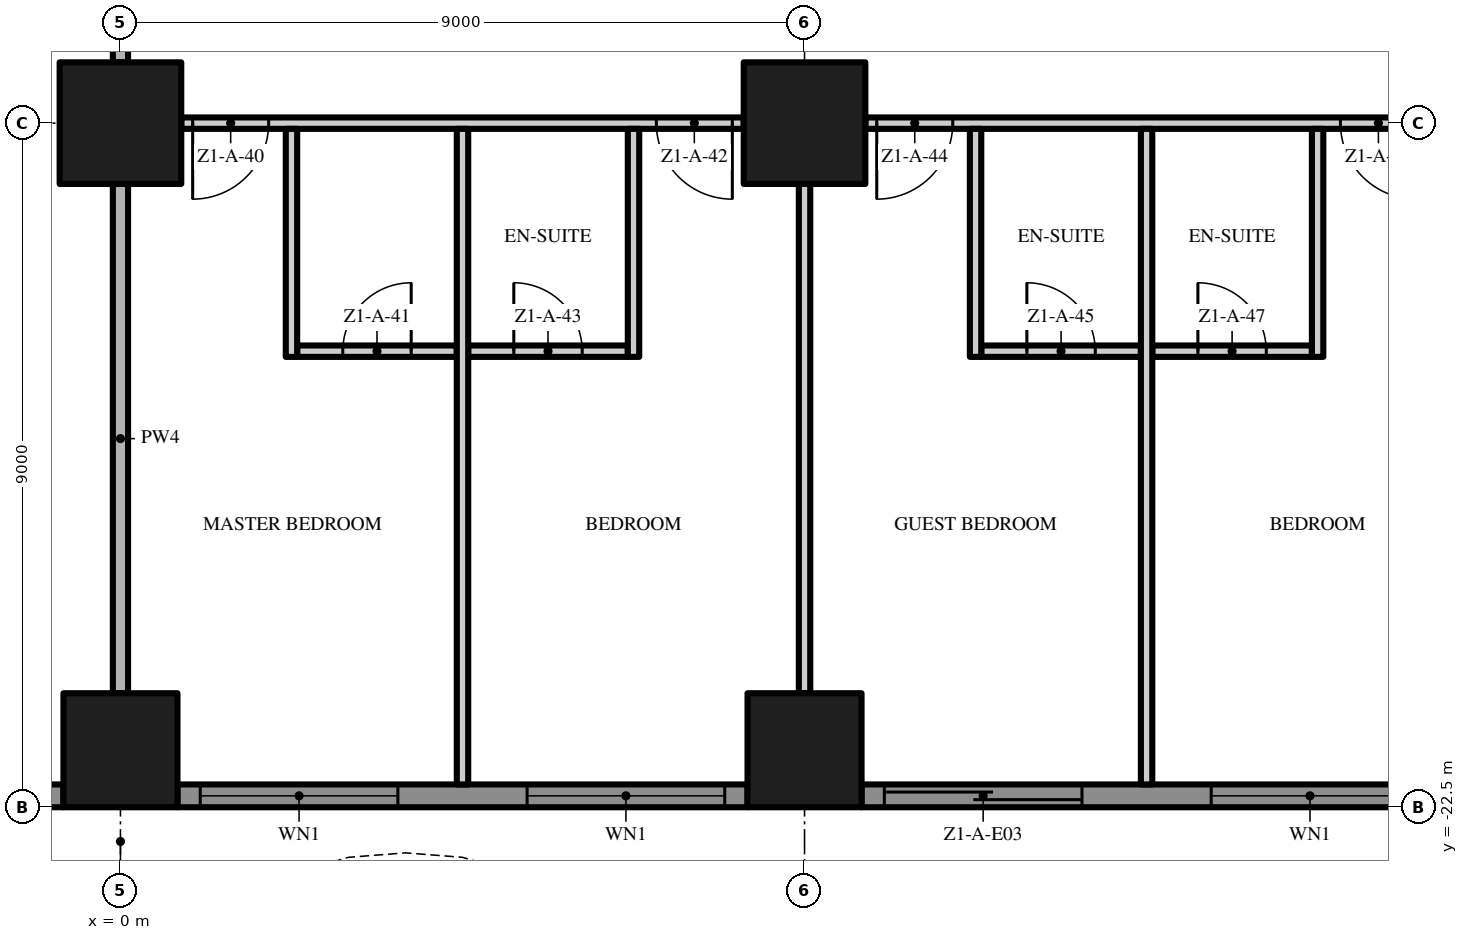
"""IFC4 building model, lengths in metres.
Left out: names, types, materials, properties, quantities, classifications, styles, units other than length and angle.
Written with IfcOpenShell. Run it as: python <this file> out.ifc"""

import sys

from ifc_helpers import new_model, si_unit, direction, frame, frame_2d, origin, origin_2d, place, context, subcontext, project, spatial, polyline, rectangle, outline, extrude, element, fill, save


model = new_model("IFC4")
c1 = context("Model", 3, precision=1e-05, world=origin(), true_north=direction((0.0, 1.0)))
c2 = subcontext(c1, "Body", "Model", "MODEL_VIEW")
j1 = project(units=[si_unit("LENGTHUNIT", "METRE"), si_unit("PLANEANGLEUNIT", "RADIAN")], contexts=[c1])
p1 = place(None, origin())
s1 = spatial("IfcSite", under=j1, at=p1, CompositionType="ELEMENT")
p2 = place(p1, origin())
s2 = spatial("IfcBuilding", under=s1, at=p2, CompositionType="ELEMENT")
p3 = place(p2, frame((0.0, 0.0, 15.0)))
s3 = spatial("IfcBuildingStorey", under=s2, at=p3, CompositionType="ELEMENT", Elevation=15.0)
p4 = place(p3, frame((0.0, -13.5, 0.0), z_axis=(0.0, 0.0, 1.0), x_axis=(1.0, 0.0, 0.0)))
e1 = element("IfcColumn", 1, at=p4, inside=s3, PredefinedType="COLUMN", context=c2, shape_type="SweptSolid", body=[
    extrude(rectangle(XDim=1.6, YDim=1.6, at=origin_2d()), origin(), (0.0, 0.0, 1.0), 3.5),
])
p5 = place(p3, frame((0.0, -21.75, 0.0), z_axis=(0.0, 0.0, 1.0), x_axis=(1.0, 0.0, 0.0)))
e2 = element("IfcColumn", 2, at=p5, inside=s3, PredefinedType="COLUMN", context=c2, shape_type="SweptSolid", body=[
    extrude(rectangle(XDim=1.5, YDim=1.5, at=origin_2d()), origin(), (0.0, 0.0, 1.0), 3.5),
])
p6 = place(p3, frame((9.0, -13.5, 0.0), z_axis=(0.0, 0.0, 1.0), x_axis=(1.0, 0.0, 0.0)))
e3 = element("IfcColumn", 3, at=p6, inside=s3, PredefinedType="COLUMN", context=c2, shape_type="SweptSolid", body=[
    extrude(rectangle(XDim=1.6, YDim=1.6, at=origin_2d()), origin(), (0.0, 0.0, 1.0), 3.5),
])
p7 = place(p3, frame((9.0, -21.75, 0.0), z_axis=(0.0, 0.0, 1.0), x_axis=(1.0, 0.0, 0.0)))
e4 = element("IfcColumn", 4, at=p7, inside=s3, PredefinedType="COLUMN", context=c2, shape_type="SweptSolid", body=[
    extrude(rectangle(XDim=1.5, YDim=1.5, at=origin_2d()), origin(), (0.0, 0.0, 1.0), 3.5),
])
p8 = place(p3, frame((-0.75, -22.35, 0.0), z_axis=(0.0, 0.0, 1.0), x_axis=(-1.0, 0.0, 0.0)))
e5 = element("IfcWall", 5, at=p8, inside=s3, PredefinedType="SOLIDWALL", context=c2, shape_type="SweptSolid", body=[
    extrude(rectangle(XDim=7.5, YDim=0.3, at=frame_2d((3.75, 0.0))), origin(), (0.0, 0.0, 1.0), 3.5),
])
p9 = place(p8, frame((4.6, 0.0, 0.45)))
e6 = element("IfcOpeningElement", 6, at=p9, cuts=e5, PredefinedType="OPENING", context=c2, shape_type="SweptSolid", body=[
    extrude(rectangle(XDim=2.6, YDim=2.65, at=frame_2d((1.3, 1.325))), frame((0.0, 0.16, 0.0), z_axis=(0.0, -1.0, 0.0), x_axis=(1.0, 0.0, 0.0)), (0.0, 0.0, 1.0), 0.32),
])
p10 = place(p8, frame((0.3, 0.0, 0.0)))
e7 = element("IfcOpeningElement", 7, at=p10, cuts=e5, PredefinedType="OPENING", context=c2, shape_type="SweptSolid", body=[
    extrude(rectangle(XDim=2.6, YDim=2.4, at=frame_2d((1.3, 1.2))), frame((0.0, 0.16, 0.0), z_axis=(0.0, -1.0, 0.0), x_axis=(1.0, 0.0, 0.0)), (0.0, 0.0, 1.0), 0.32),
])
p11 = place(p3, frame((8.25, -22.35, 0.0), z_axis=(0.0, 0.0, 1.0), x_axis=(-1.0, 0.0, 0.0)))
e8 = element("IfcWall", 8, at=p11, inside=s3, PredefinedType="SOLIDWALL", context=c2, shape_type="SweptSolid", body=[
    extrude(rectangle(XDim=7.5, YDim=0.3, at=frame_2d((3.75, 0.0))), origin(), (0.0, 0.0, 1.0), 3.5),
])
p12 = place(p11, frame((4.6, 0.0, 0.45)))
e9 = element("IfcOpeningElement", 9, at=p12, cuts=e8, PredefinedType="OPENING", context=c2, shape_type="SweptSolid", body=[
    extrude(rectangle(XDim=2.6, YDim=2.65, at=frame_2d((1.3, 1.325))), frame((0.0, 0.16, 0.0), z_axis=(0.0, -1.0, 0.0), x_axis=(1.0, 0.0, 0.0)), (0.0, 0.0, 1.0), 0.32),
])
p13 = place(p11, frame((0.3, 0.0, 0.45)))
e10 = element("IfcOpeningElement", 10, at=p13, cuts=e8, PredefinedType="OPENING", context=c2, shape_type="SweptSolid", body=[
    extrude(rectangle(XDim=2.6, YDim=2.65, at=frame_2d((1.3, 1.325))), frame((0.0, 0.16, 0.0), z_axis=(0.0, -1.0, 0.0), x_axis=(1.0, 0.0, 0.0)), (0.0, 0.0, 1.0), 0.32),
])
p14 = place(p3, frame((17.25, -22.35, 0.0), z_axis=(0.0, 0.0, 1.0), x_axis=(-1.0, 0.0, 0.0)))
e11 = element("IfcWall", 11, at=p14, inside=s3, PredefinedType="SOLIDWALL", context=c2, shape_type="SweptSolid", body=[
    extrude(rectangle(XDim=7.5, YDim=0.3, at=frame_2d((3.75, 0.0))), origin(), (0.0, 0.0, 1.0), 3.5),
])
p15 = place(p14, frame((4.6, 0.0, 0.0)))
e12 = element("IfcOpeningElement", 12, at=p15, cuts=e11, PredefinedType="OPENING", context=c2, shape_type="SweptSolid", body=[
    extrude(rectangle(XDim=2.6, YDim=2.4, at=frame_2d((1.3, 1.2))), frame((0.0, 0.16, 0.0), z_axis=(0.0, -1.0, 0.0), x_axis=(1.0, 0.0, 0.0)), (0.0, 0.0, 1.0), 0.32),
])
p16 = place(p14, frame((0.3, 0.0, 0.45)))
e13 = element("IfcOpeningElement", 13, at=p16, cuts=e11, PredefinedType="OPENING", context=c2, shape_type="SweptSolid", body=[
    extrude(rectangle(XDim=2.6, YDim=2.65, at=frame_2d((1.3, 1.325))), frame((0.0, 0.16, 0.0), z_axis=(0.0, -1.0, 0.0), x_axis=(1.0, 0.0, 0.0)), (0.0, 0.0, 1.0), 0.32),
])
p17 = place(p3, origin())
e14 = element("IfcWall", 14, at=p17, inside=s3, PredefinedType="USERDEFINED", context=c2, shape_type="SweptSolid", body=[
    extrude(outline(polyline([(-22.5, -24.3), (-21.0, -25.005), (-19.5, -25.441), (-18.75, -25.5), (-18.0, -25.441), (-16.5, -25.005), (-15.0, -24.3), (-13.5, -23.595), (-12.0, -23.159), (-11.25, -23.1), (-10.5, -23.159), (-9.0, -23.595), (-7.5, -24.3), (-6.0, -25.005), (-4.5, -25.441), (-3.75, -25.5), (-3.0, -25.441), (-1.5, -25.005), (0.0, -24.3), (1.5, -23.595), (3.0, -23.159), (3.75, -23.1), (4.5, -23.159), (6.0, -23.595), (7.5, -24.3), (9.0, -25.005), (10.5, -25.441), (11.25, -25.5), (12.0, -25.441), (13.5, -25.005), (15.0, -24.3), (16.5, -23.595), (18.0, -23.159), (18.75, -23.1), (19.5, -23.159), (21.0, -23.595), (22.5, -24.3), (22.606, -24.074), (21.089, -23.36), (19.545, -22.911), (18.75, -22.849), (17.955, -22.911), (16.411, -23.36), (14.894, -24.074), (13.411, -24.771), (11.955, -25.194), (11.25, -25.249), (10.545, -25.194), (9.089, -24.771), (7.606, -24.074), (6.089, -23.36), (4.545, -22.911), (3.75, -22.849), (2.955, -22.911), (1.411, -23.36), (-0.106, -24.074), (-1.589, -24.771), (-3.045, -25.194), (-3.75, -25.249), (-4.455, -25.194), (-5.911, -24.771), (-7.394, -24.074), (-8.911, -23.36), (-10.455, -22.911), (-11.25, -22.849), (-12.045, -22.911), (-13.589, -23.36), (-15.106, -24.074), (-16.589, -24.771), (-18.045, -25.194), (-18.75, -25.249), (-19.455, -25.194), (-20.911, -24.771), (-22.394, -24.074), (-22.5, -24.3)])), origin(), (0.0, 0.0, 1.0), 0.9),
])
p18 = place(p3, frame((2.325, -16.5, 0.0), z_axis=(0.0, 0.0, 1.0), x_axis=(1.0, 0.0, 0.0)))
e15 = element("IfcWall", 15, at=p18, inside=s3, PredefinedType="PARTITIONING", context=c2, shape_type="SweptSolid", body=[
    extrude(rectangle(XDim=2.1, YDim=0.15, at=frame_2d((1.05, 0.0))), origin(), (0.0, 0.0, 1.0), 3.5),
])
p19 = place(p18, frame((0.6, 0.0, 0.0)))
e16 = element("IfcOpeningElement", 16, at=p19, cuts=e15, PredefinedType="OPENING", context=c2, shape_type="SweptSolid", body=[
    extrude(rectangle(XDim=0.9, YDim=2.1, at=frame_2d((0.45, 1.05))), frame((0.0, 0.085, 0.0), z_axis=(0.0, -1.0, 0.0), x_axis=(1.0, 0.0, 0.0)), (0.0, 0.0, 1.0), 0.17),
])
p20 = place(p3, frame((4.575, -16.5, 0.0), z_axis=(0.0, 0.0, 1.0), x_axis=(1.0, 0.0, 0.0)))
e17 = element("IfcWall", 17, at=p20, inside=s3, PredefinedType="PARTITIONING", context=c2, shape_type="SweptSolid", body=[
    extrude(rectangle(XDim=2.1, YDim=0.15, at=frame_2d((1.05, 0.0))), origin(), (0.0, 0.0, 1.0), 3.5),
])
p21 = place(p20, frame((0.6, 0.0, 0.0)))
e18 = element("IfcOpeningElement", 18, at=p21, cuts=e17, PredefinedType="OPENING", context=c2, shape_type="SweptSolid", body=[
    extrude(rectangle(XDim=0.9, YDim=2.1, at=frame_2d((0.45, 1.05))), frame((0.0, 0.085, 0.0), z_axis=(0.0, -1.0, 0.0), x_axis=(1.0, 0.0, 0.0)), (0.0, 0.0, 1.0), 0.17),
])
p22 = place(p3, frame((11.325, -16.5, 0.0), z_axis=(0.0, 0.0, 1.0), x_axis=(1.0, 0.0, 0.0)))
e19 = element("IfcWall", 19, at=p22, inside=s3, PredefinedType="PARTITIONING", context=c2, shape_type="SweptSolid", body=[
    extrude(rectangle(XDim=2.1, YDim=0.15, at=frame_2d((1.05, 0.0))), origin(), (0.0, 0.0, 1.0), 3.5),
])
p23 = place(p22, frame((0.6, 0.0, 0.0)))
e20 = element("IfcOpeningElement", 20, at=p23, cuts=e19, PredefinedType="OPENING", context=c2, shape_type="SweptSolid", body=[
    extrude(rectangle(XDim=0.9, YDim=2.1, at=frame_2d((0.45, 1.05))), frame((0.0, 0.085, 0.0), z_axis=(0.0, -1.0, 0.0), x_axis=(1.0, 0.0, 0.0)), (0.0, 0.0, 1.0), 0.17),
])
p24 = place(p3, frame((13.575, -16.5, 0.0), z_axis=(0.0, 0.0, 1.0), x_axis=(1.0, 0.0, 0.0)))
e21 = element("IfcWall", 21, at=p24, inside=s3, PredefinedType="PARTITIONING", context=c2, shape_type="SweptSolid", body=[
    extrude(rectangle(XDim=2.1, YDim=0.15, at=frame_2d((1.05, 0.0))), origin(), (0.0, 0.0, 1.0), 3.5),
])
p25 = place(p24, frame((0.6, 0.0, 0.0)))
e22 = element("IfcOpeningElement", 22, at=p25, cuts=e21, PredefinedType="OPENING", context=c2, shape_type="SweptSolid", body=[
    extrude(rectangle(XDim=0.9, YDim=2.1, at=frame_2d((0.45, 1.05))), frame((0.0, 0.085, 0.0), z_axis=(0.0, -1.0, 0.0), x_axis=(1.0, 0.0, 0.0)), (0.0, 0.0, 1.0), 0.17),
])
p26 = place(p3, frame((8.2, -13.5, 0.0), z_axis=(0.0, 0.0, 1.0), x_axis=(-1.0, 0.0, 0.0)))
e23 = element("IfcWall", 23, at=p26, inside=s3, PredefinedType="PARTITIONING", context=c2, shape_type="SweptSolid", body=[
    extrude(rectangle(XDim=7.4, YDim=0.15, at=frame_2d((3.7, 0.0))), origin(), (0.0, 0.0, 1.0), 3.5),
])
p27 = place(p26, frame((6.25, 0.0, 0.0)))
e24 = element("IfcOpeningElement", 24, at=p27, cuts=e23, PredefinedType="OPENING", context=c2, shape_type="SweptSolid", body=[
    extrude(rectangle(XDim=1.0, YDim=2.4, at=frame_2d((0.5, 1.2))), frame((0.0, 0.085, 0.0), z_axis=(0.0, -1.0, 0.0), x_axis=(1.0, 0.0, 0.0)), (0.0, 0.0, 1.0), 0.17),
])
p28 = place(p26, frame((0.15, 0.0, 0.0)))
e25 = element("IfcOpeningElement", 25, at=p28, cuts=e23, PredefinedType="OPENING", context=c2, shape_type="SweptSolid", body=[
    extrude(rectangle(XDim=1.0, YDim=2.4, at=frame_2d((0.5, 1.2))), frame((0.0, 0.085, 0.0), z_axis=(0.0, -1.0, 0.0), x_axis=(1.0, 0.0, 0.0)), (0.0, 0.0, 1.0), 0.17),
])
p29 = place(p3, frame((17.2, -13.5, 0.0), z_axis=(0.0, 0.0, 1.0), x_axis=(-1.0, 0.0, 0.0)))
e26 = element("IfcWall", 26, at=p29, inside=s3, PredefinedType="PARTITIONING", context=c2, shape_type="SweptSolid", body=[
    extrude(rectangle(XDim=7.4, YDim=0.15, at=frame_2d((3.7, 0.0))), origin(), (0.0, 0.0, 1.0), 3.5),
])
p30 = place(p29, frame((6.25, 0.0, 0.0)))
e27 = element("IfcOpeningElement", 27, at=p30, cuts=e26, PredefinedType="OPENING", context=c2, shape_type="SweptSolid", body=[
    extrude(rectangle(XDim=1.0, YDim=2.4, at=frame_2d((0.5, 1.2))), frame((0.0, 0.085, 0.0), z_axis=(0.0, -1.0, 0.0), x_axis=(1.0, 0.0, 0.0)), (0.0, 0.0, 1.0), 0.17),
])
p31 = place(p29, frame((0.15, 0.0, 0.0)))
e28 = element("IfcOpeningElement", 28, at=p31, cuts=e26, PredefinedType="OPENING", context=c2, shape_type="SweptSolid", body=[
    extrude(rectangle(XDim=1.0, YDim=2.4, at=frame_2d((0.5, 1.2))), frame((0.0, 0.085, 0.0), z_axis=(0.0, -1.0, 0.0), x_axis=(1.0, 0.0, 0.0)), (0.0, 0.0, 1.0), 0.17),
])
p32 = place(p3, frame((0.0, -21.0, 0.0), z_axis=(0.0, 0.0, 1.0), x_axis=(0.0, 1.0, 0.0)))
e29 = element("IfcWall", 29, at=p32, inside=s3, PredefinedType="PARTITIONING", context=c2, shape_type="SweptSolid", body=[
    extrude(rectangle(XDim=6.7, YDim=0.2, at=frame_2d((3.35, 0.0))), origin(), (0.0, 0.0, 1.0), 3.5),
])
p33 = place(p3, frame((0.0, -12.7, 0.0), z_axis=(0.0, 0.0, 1.0), x_axis=(0.0, 1.0, 0.0)))
e30 = element("IfcWall", 30, at=p33, inside=s3, PredefinedType="PARTITIONING", context=c2, shape_type="SweptSolid", body=[
    extrude(rectangle(XDim=7.4, YDim=0.2, at=frame_2d((3.7, 0.0))), origin(), (0.0, 0.0, 1.0), 3.5),
])
p34 = place(p3, frame((2.25, -16.575, 0.0), z_axis=(0.0, 0.0, 1.0), x_axis=(0.0, 1.0, 0.0)))
e31 = element("IfcWall", 31, at=p34, inside=s3, PredefinedType="PARTITIONING", context=c2, shape_type="SweptSolid", body=[
    extrude(rectangle(XDim=3.0, YDim=0.15, at=frame_2d((1.5, 0.0))), origin(), (0.0, 0.0, 1.0), 3.5),
])
p35 = place(p3, frame((4.5, -22.2, 0.0), z_axis=(0.0, 0.0, 1.0), x_axis=(0.0, 1.0, 0.0)))
e32 = element("IfcWall", 32, at=p35, inside=s3, PredefinedType="PARTITIONING", context=c2, shape_type="SweptSolid", body=[
    extrude(rectangle(XDim=8.625, YDim=0.15, at=frame_2d((4.312, 0.0))), origin(), (0.0, 0.0, 1.0), 3.5),
])
p36 = place(p3, frame((6.75, -16.575, 0.0), z_axis=(0.0, 0.0, 1.0), x_axis=(0.0, 1.0, 0.0)))
e33 = element("IfcWall", 33, at=p36, inside=s3, PredefinedType="PARTITIONING", context=c2, shape_type="SweptSolid", body=[
    extrude(rectangle(XDim=3.0, YDim=0.15, at=frame_2d((1.5, 0.0))), origin(), (0.0, 0.0, 1.0), 3.5),
])
p37 = place(p3, frame((9.0, -21.0, 0.0), z_axis=(0.0, 0.0, 1.0), x_axis=(0.0, 1.0, 0.0)))
e34 = element("IfcWall", 34, at=p37, inside=s3, PredefinedType="PARTITIONING", context=c2, shape_type="SweptSolid", body=[
    extrude(rectangle(XDim=6.7, YDim=0.15, at=frame_2d((3.35, 0.0))), origin(), (0.0, 0.0, 1.0), 3.5),
])
p38 = place(p3, frame((11.25, -16.575, 0.0), z_axis=(0.0, 0.0, 1.0), x_axis=(0.0, 1.0, 0.0)))
e35 = element("IfcWall", 35, at=p38, inside=s3, PredefinedType="PARTITIONING", context=c2, shape_type="SweptSolid", body=[
    extrude(rectangle(XDim=3.0, YDim=0.15, at=frame_2d((1.5, 0.0))), origin(), (0.0, 0.0, 1.0), 3.5),
])
p39 = place(p3, frame((13.5, -22.2, 0.0), z_axis=(0.0, 0.0, 1.0), x_axis=(0.0, 1.0, 0.0)))
e36 = element("IfcWall", 36, at=p39, inside=s3, PredefinedType="PARTITIONING", context=c2, shape_type="SweptSolid", body=[
    extrude(rectangle(XDim=8.625, YDim=0.15, at=frame_2d((4.312, 0.0))), origin(), (0.0, 0.0, 1.0), 3.5),
])
p40 = place(p3, frame((15.75, -16.575, 0.0), z_axis=(0.0, 0.0, 1.0), x_axis=(0.0, 1.0, 0.0)))
e37 = element("IfcWall", 37, at=p40, inside=s3, PredefinedType="PARTITIONING", context=c2, shape_type="SweptSolid", body=[
    extrude(rectangle(XDim=3.0, YDim=0.15, at=frame_2d((1.5, 0.0))), origin(), (0.0, 0.0, 1.0), 3.5),
])
p41 = place(p12, origin())
e38 = element("IfcWindow", 38, at=p41, inside=s3, PartitioningType="SINGLE_PANEL", PredefinedType="WINDOW", context=c2, shape_type="SweptSolid", body=[
    extrude(rectangle(XDim=2.6, YDim=2.65, at=frame_2d((1.3, 1.325))), frame((0.0, 0.03, 0.0), z_axis=(0.0, -1.0, 0.0), x_axis=(1.0, 0.0, 0.0)), (0.0, 0.0, 1.0), 0.06),
])
fill(e9, e38)
p42 = place(p13, origin())
e39 = element("IfcWindow", 39, at=p42, inside=s3, PartitioningType="SINGLE_PANEL", PredefinedType="WINDOW", context=c2, shape_type="SweptSolid", body=[
    extrude(rectangle(XDim=2.6, YDim=2.65, at=frame_2d((1.3, 1.325))), frame((0.0, 0.03, 0.0), z_axis=(0.0, -1.0, 0.0), x_axis=(1.0, 0.0, 0.0)), (0.0, 0.0, 1.0), 0.06),
])
fill(e10, e39)
p43 = place(p15, origin())
e40 = element("IfcDoor", 40, at=p43, inside=s3, OperationType="SINGLE_SWING_LEFT", PredefinedType="DOOR", context=c2, shape_type="SweptSolid", body=[
    extrude(rectangle(XDim=2.6, YDim=2.4, at=frame_2d((1.3, 1.2))), frame((0.0, 0.025, 0.0), z_axis=(0.0, -1.0, 0.0), x_axis=(1.0, 0.0, 0.0)), (0.0, 0.0, 1.0), 0.05),
])
fill(e12, e40)
p44 = place(p16, origin())
e41 = element("IfcWindow", 41, at=p44, inside=s3, PartitioningType="SINGLE_PANEL", PredefinedType="WINDOW", context=c2, shape_type="SweptSolid", body=[
    extrude(rectangle(XDim=2.6, YDim=2.65, at=frame_2d((1.3, 1.325))), frame((0.0, 0.03, 0.0), z_axis=(0.0, -1.0, 0.0), x_axis=(1.0, 0.0, 0.0)), (0.0, 0.0, 1.0), 0.06),
])
fill(e13, e41)
p45 = place(p27, origin())
e42 = element("IfcDoor", 42, at=p45, inside=s3, OperationType="SINGLE_SWING_RIGHT", PredefinedType="DOOR", context=c2, shape_type="SweptSolid", body=[
    extrude(rectangle(XDim=1.0, YDim=2.4, at=frame_2d((0.5, 1.2))), frame((0.0, 0.025, 0.0), z_axis=(0.0, -1.0, 0.0), x_axis=(1.0, 0.0, 0.0)), (0.0, 0.0, 1.0), 0.05),
])
fill(e24, e42)
p46 = place(p19, origin())
e43 = element("IfcDoor", 43, at=p46, inside=s3, OperationType="SINGLE_SWING_RIGHT", PredefinedType="DOOR", context=c2, shape_type="SweptSolid", body=[
    extrude(rectangle(XDim=0.9, YDim=2.1, at=frame_2d((0.45, 1.05))), frame((0.0, 0.025, 0.0), z_axis=(0.0, -1.0, 0.0), x_axis=(1.0, 0.0, 0.0)), (0.0, 0.0, 1.0), 0.05),
])
fill(e16, e43)
p47 = place(p28, origin())
e44 = element("IfcDoor", 44, at=p47, inside=s3, OperationType="SINGLE_SWING_LEFT", PredefinedType="DOOR", context=c2, shape_type="SweptSolid", body=[
    extrude(rectangle(XDim=1.0, YDim=2.4, at=frame_2d((0.5, 1.2))), frame((0.0, 0.025, 0.0), z_axis=(0.0, -1.0, 0.0), x_axis=(1.0, 0.0, 0.0)), (0.0, 0.0, 1.0), 0.05),
])
fill(e25, e44)
p48 = place(p21, origin())
e45 = element("IfcDoor", 45, at=p48, inside=s3, OperationType="SINGLE_SWING_LEFT", PredefinedType="DOOR", context=c2, shape_type="SweptSolid", body=[
    extrude(rectangle(XDim=0.9, YDim=2.1, at=frame_2d((0.45, 1.05))), frame((0.0, 0.025, 0.0), z_axis=(0.0, -1.0, 0.0), x_axis=(1.0, 0.0, 0.0)), (0.0, 0.0, 1.0), 0.05),
])
fill(e18, e45)
p49 = place(p30, origin())
e46 = element("IfcDoor", 46, at=p49, inside=s3, OperationType="SINGLE_SWING_RIGHT", PredefinedType="DOOR", context=c2, shape_type="SweptSolid", body=[
    extrude(rectangle(XDim=1.0, YDim=2.4, at=frame_2d((0.5, 1.2))), frame((0.0, 0.025, 0.0), z_axis=(0.0, -1.0, 0.0), x_axis=(1.0, 0.0, 0.0)), (0.0, 0.0, 1.0), 0.05),
])
fill(e27, e46)
p50 = place(p23, origin())
e47 = element("IfcDoor", 47, at=p50, inside=s3, OperationType="SINGLE_SWING_LEFT", PredefinedType="DOOR", context=c2, shape_type="SweptSolid", body=[
    extrude(rectangle(XDim=0.9, YDim=2.1, at=frame_2d((0.45, 1.05))), frame((0.0, 0.025, 0.0), z_axis=(0.0, -1.0, 0.0), x_axis=(1.0, 0.0, 0.0)), (0.0, 0.0, 1.0), 0.05),
])
fill(e20, e47)
p51 = place(p31, origin())
e48 = element("IfcDoor", 48, at=p51, inside=s3, OperationType="SINGLE_SWING_LEFT", PredefinedType="DOOR", context=c2, shape_type="SweptSolid", body=[
    extrude(rectangle(XDim=1.0, YDim=2.4, at=frame_2d((0.5, 1.2))), frame((0.0, 0.025, 0.0), z_axis=(0.0, -1.0, 0.0), x_axis=(1.0, 0.0, 0.0)), (0.0, 0.0, 1.0), 0.05),
])
fill(e28, e48)
p52 = place(p25, origin())
e49 = element("IfcDoor", 49, at=p52, inside=s3, OperationType="SINGLE_SWING_LEFT", PredefinedType="DOOR", context=c2, shape_type="SweptSolid", body=[
    extrude(rectangle(XDim=0.9, YDim=2.1, at=frame_2d((0.45, 1.05))), frame((0.0, 0.025, 0.0), z_axis=(0.0, -1.0, 0.0), x_axis=(1.0, 0.0, 0.0)), (0.0, 0.0, 1.0), 0.05),
])
fill(e22, e49)
save(model, sys.argv[1])
